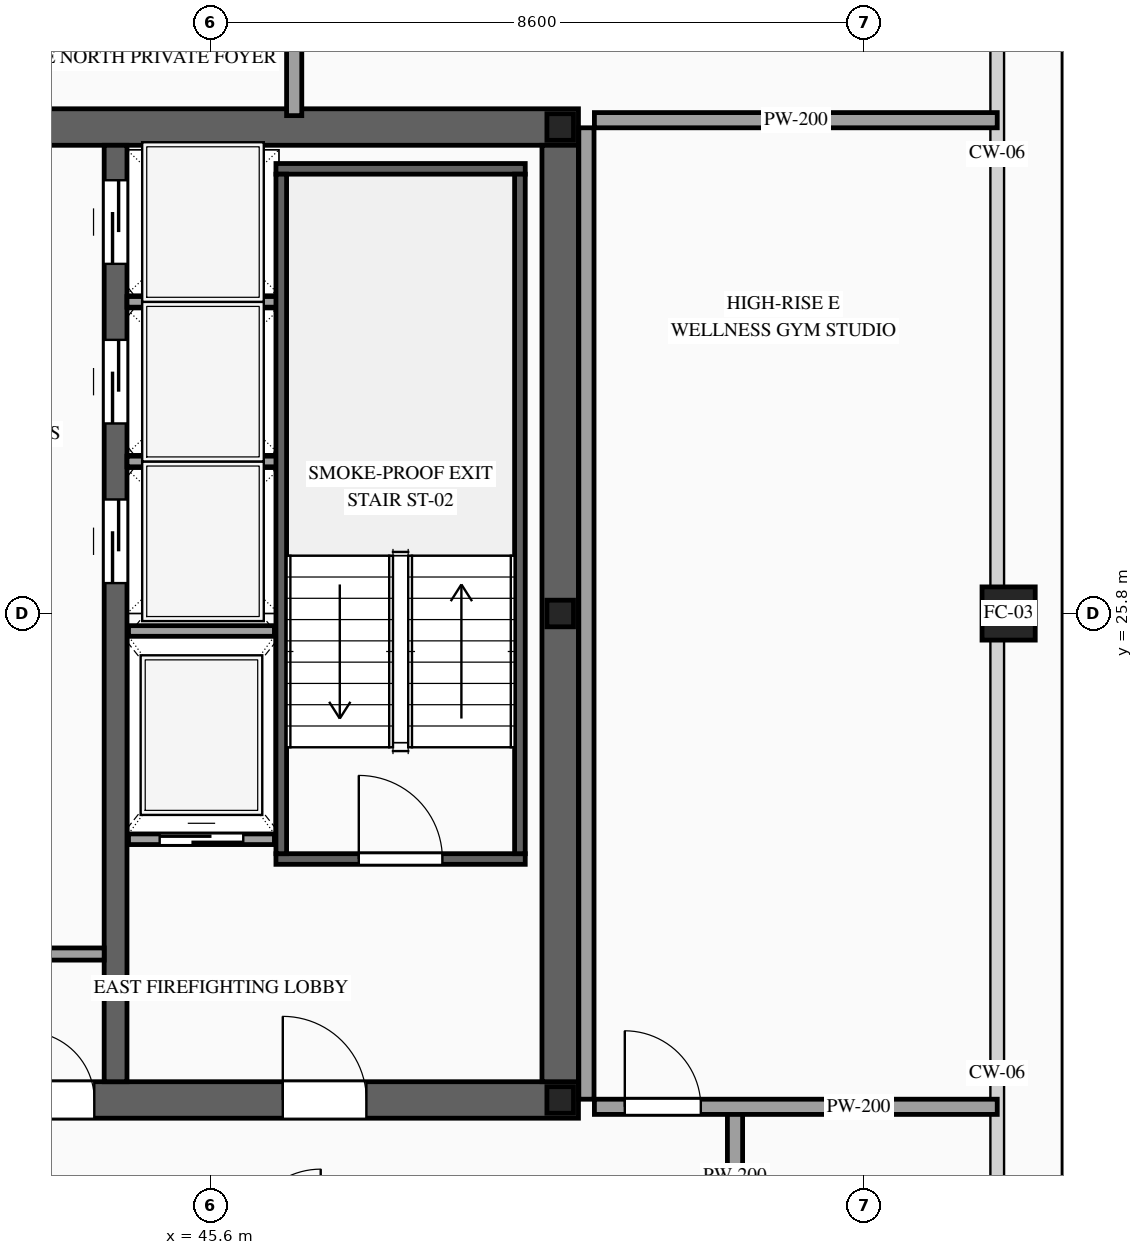
"""IFC4 building model, lengths in metres.
Left out: names, types, materials, properties, quantities, classifications, styles, units other than length and angle.
Written with IfcOpenShell. Run it as: python <this file> out.ifc"""

import sys

from ifc_helpers import new_model, si_unit, direction, frame, frame_2d, origin, origin_2d, place, context, subcontext, project, spatial, rectangle, hollow_rectangle, i_section, extrude, source, transform, mapped, element, fill, save


model = new_model("IFC4")
c1 = context("Model", 3, precision=1e-05, world=origin(), true_north=direction((0.0, 1.0)))
c2 = subcontext(c1, "Body", "Model", "MODEL_VIEW")
j1 = project(units=[si_unit("LENGTHUNIT", "METRE"), si_unit("PLANEANGLEUNIT", "RADIAN")], contexts=[c1])
p1 = place(None, origin())
s1 = spatial("IfcSite", under=j1, at=p1, CompositionType="ELEMENT")
p2 = place(p1, origin())
s2 = spatial("IfcBuilding", under=s1, at=p2, CompositionType="ELEMENT")
p3 = place(p2, frame((0.0, 0.0, 299.6)))
s3 = spatial("IfcBuildingStorey", under=s2, at=p3, CompositionType="ELEMENT", Elevation=299.6)
p4 = place(p3, frame((23.56, 19.4, 0.0), z_axis=(0.0, 0.0, 1.0), x_axis=(1.0, 0.0, 0.0)))
e1 = element("IfcWall", 1, at=p4, inside=s3, PredefinedType="SHEAR", context=c2, shape_type="SweptSolid", body=[
    extrude(rectangle(XDim=26.88, YDim=0.48, at=frame_2d((13.44, 0.0))), origin(), (0.0, 0.0, 1.0), 3.5),
])
p5 = place(p4, frame((1.89, 0.0, 0.0)))
e2 = element("IfcOpeningElement", 2, at=p5, cuts=e1, PredefinedType="OPENING", context=c2, shape_type="SweptSolid", body=[
    extrude(rectangle(XDim=1.1, YDim=2.2, at=frame_2d((0.55, 1.1))), frame((0.0, 0.255, 0.0), z_axis=(0.0, -1.0, 0.0), x_axis=(1.0, 0.0, 0.0)), (0.0, 0.0, 1.0), 0.51),
])
p6 = place(p4, frame((9.79, 0.0, 0.0)))
e3 = element("IfcOpeningElement", 3, at=p6, cuts=e1, PredefinedType="OPENING", context=c2, shape_type="SweptSolid", body=[
    extrude(rectangle(XDim=1.1, YDim=2.2, at=frame_2d((0.55, 1.1))), frame((0.0, 0.255, 0.0), z_axis=(0.0, -1.0, 0.0), x_axis=(1.0, 0.0, 0.0)), (0.0, 0.0, 1.0), 0.51),
])
p7 = place(p4, frame((22.99, 0.0, 0.0)))
e4 = element("IfcOpeningElement", 4, at=p7, cuts=e1, PredefinedType="OPENING", context=c2, shape_type="SweptSolid", body=[
    extrude(rectangle(XDim=1.1, YDim=2.2, at=frame_2d((0.55, 1.1))), frame((0.0, 0.255, 0.0), z_axis=(0.0, -1.0, 0.0), x_axis=(1.0, 0.0, 0.0)), (0.0, 0.0, 1.0), 0.51),
])
p8 = place(p4, frame((19.61, 0.0, 0.0)))
e5 = element("IfcOpeningElement", 5, at=p8, cuts=e1, PredefinedType="OPENING", context=c2, shape_type="SweptSolid", body=[
    extrude(rectangle(XDim=0.9, YDim=2.15, at=frame_2d((0.45, 1.075))), frame((0.0, 0.255, 0.0), z_axis=(0.0, -1.0, 0.0), x_axis=(1.0, 0.0, 0.0)), (0.0, 0.0, 1.0), 0.51),
])
p9 = place(p4, frame((18.17, 0.0, 0.0)))
e6 = element("IfcOpeningElement", 6, at=p9, cuts=e1, PredefinedType="OPENING", context=c2, shape_type="SweptSolid", body=[
    extrude(rectangle(XDim=0.9, YDim=2.15, at=frame_2d((0.45, 1.075))), frame((0.0, 0.255, 0.0), z_axis=(0.0, -1.0, 0.0), x_axis=(1.0, 0.0, 0.0)), (0.0, 0.0, 1.0), 0.51),
])
p10 = place(p3, frame((23.56, 32.2, 0.0), z_axis=(0.0, 0.0, 1.0), x_axis=(1.0, 0.0, 0.0)))
e7 = element("IfcWall", 7, at=p10, inside=s3, PredefinedType="SHEAR", context=c2, shape_type="SweptSolid", body=[
    extrude(rectangle(XDim=26.88, YDim=0.48, at=frame_2d((13.44, 0.0))), origin(), (0.0, 0.0, 1.0), 3.5),
])
p11 = place(p10, frame((4.51, 0.0, 0.0)))
e8 = element("IfcOpeningElement", 8, at=p11, cuts=e7, PredefinedType="OPENING", context=c2, shape_type="SweptSolid", body=[
    extrude(rectangle(XDim=0.9, YDim=2.15, at=frame_2d((0.45, 1.075))), frame((0.0, 0.255, 0.0), z_axis=(0.0, -1.0, 0.0), x_axis=(1.0, 0.0, 0.0)), (0.0, 0.0, 1.0), 0.51),
])
p12 = place(p10, frame((9.79, 0.0, 0.0)))
e9 = element("IfcOpeningElement", 9, at=p12, cuts=e7, PredefinedType="OPENING", context=c2, shape_type="SweptSolid", body=[
    extrude(rectangle(XDim=1.1, YDim=2.2, at=frame_2d((0.55, 1.1))), frame((0.0, 0.255, 0.0), z_axis=(0.0, -1.0, 0.0), x_axis=(1.0, 0.0, 0.0)), (0.0, 0.0, 1.0), 0.51),
])
p13 = place(p10, frame((15.64, 0.0, 0.0)))
e10 = element("IfcOpeningElement", 10, at=p13, cuts=e7, PredefinedType="OPENING", context=c2, shape_type="SweptSolid", body=[
    extrude(rectangle(XDim=1.1, YDim=2.2, at=frame_2d((0.55, 1.1))), frame((0.0, 0.255, 0.0), z_axis=(0.0, -1.0, 0.0), x_axis=(1.0, 0.0, 0.0)), (0.0, 0.0, 1.0), 0.51),
])
p14 = place(p10, frame((18.74, 0.0, 0.0)))
e11 = element("IfcOpeningElement", 11, at=p14, cuts=e7, PredefinedType="OPENING", context=c2, shape_type="SweptSolid", body=[
    extrude(rectangle(XDim=1.1, YDim=2.2, at=frame_2d((0.55, 1.1))), frame((0.0, 0.255, 0.0), z_axis=(0.0, -1.0, 0.0), x_axis=(1.0, 0.0, 0.0)), (0.0, 0.0, 1.0), 0.51),
])
m1 = source(origin(), c2, "Body", "SweptSolid", [
    extrude(rectangle(XDim=12.32, YDim=0.48, at=frame_2d((6.16, 0.0))), origin(), (0.0, 0.0, 1.0), 3.5),
])
p15 = place(p3, frame((50.2, 19.64, 0.0), z_axis=(0.0, 0.0, 1.0), x_axis=(0.0, 1.0, 0.0)))
e12 = element("IfcWall", 12, at=p15, inside=s3, PredefinedType="SHEAR", context=c2, shape_type="MappedRepresentation", body=[
    mapped(m1, transform((0.0, 0.0, 0.0), scale=1.0)),
])
p16 = place(p3, frame((44.35, 19.64, 0.0), z_axis=(0.0, 0.0, 1.0), x_axis=(0.0, 1.0, 0.0)))
e13 = element("IfcWall", 13, at=p16, inside=s3, PredefinedType="SOLIDWALL", context=c2, shape_type="SweptSolid", body=[
    extrude(rectangle(XDim=12.32, YDim=0.3, at=frame_2d((6.16, 0.0))), origin(), (0.0, 0.0, 1.0), 3.5),
])
p17 = place(p16, frame((6.56, 0.0, 0.0)))
e14 = element("IfcOpeningElement", 14, at=p17, cuts=e13, PredefinedType="OPENING", context=c2, shape_type="SweptSolid", body=[
    extrude(rectangle(XDim=1.1, YDim=2.2, at=frame_2d((0.55, 1.1))), frame((0.0, 0.165, 0.0), z_axis=(0.0, -1.0, 0.0), x_axis=(1.0, 0.0, 0.0)), (0.0, 0.0, 1.0), 0.33),
])
p18 = place(p16, frame((8.66, 0.0, 0.0)))
e15 = element("IfcOpeningElement", 15, at=p18, cuts=e13, PredefinedType="OPENING", context=c2, shape_type="SweptSolid", body=[
    extrude(rectangle(XDim=1.1, YDim=2.2, at=frame_2d((0.55, 1.1))), frame((0.0, 0.165, 0.0), z_axis=(0.0, -1.0, 0.0), x_axis=(1.0, 0.0, 0.0)), (0.0, 0.0, 1.0), 0.33),
])
p19 = place(p16, frame((10.76, 0.0, 0.0)))
e16 = element("IfcOpeningElement", 16, at=p19, cuts=e13, PredefinedType="OPENING", context=c2, shape_type="SweptSolid", body=[
    extrude(rectangle(XDim=1.1, YDim=2.2, at=frame_2d((0.55, 1.1))), frame((0.0, 0.165, 0.0), z_axis=(0.0, -1.0, 0.0), x_axis=(1.0, 0.0, 0.0)), (0.0, 0.0, 1.0), 0.33),
])
m2 = source(origin(), c2, "Body", "SweptSolid", [
    extrude(i_section(OverallWidth=0.35, OverallDepth=0.35, WebThickness=0.012, FlangeThickness=0.019, at=origin_2d()), origin(), (0.0, 0.0, 1.0), 3.5),
])
for number, where, z_axis, x_axis in (
    (17, (50.2, 19.4, 0.0), (0.0, 0.0, 1.0), (1.0, 0.0, 0.0)),
    (18, (50.2, 25.8, 0.0), (0.0, 0.0, 1.0), (1.0, 0.0, 0.0)),
    (19, (50.2, 32.2, 0.0), (0.0, 0.0, 1.0), (1.0, 0.0, 0.0)),
):
    element("IfcColumn", number, at=place(p3, frame(where, z_axis=z_axis, x_axis=x_axis)), inside=s3, PredefinedType="COLUMN", context=c2, shape_type="MappedRepresentation", body=[
        mapped(m2, transform((0.0, 0.0, 0.0), scale=1.0)),
    ])
m3 = source(origin(), c2, "Body", "SweptSolid", [
    extrude(hollow_rectangle(XDim=0.7, YDim=0.7, WallThickness=0.032, at=origin_2d()), origin(), (0.0, 0.0, 1.0), 3.5),
])
p20 = place(p3, frame((56.1, 25.8, 0.0), z_axis=(0.0, 0.0, 1.0), x_axis=(1.0, 0.0, 0.0)))
e20 = element("IfcColumn", 20, at=p20, inside=s3, PredefinedType="COLUMN", context=c2, shape_type="MappedRepresentation", body=[
    mapped(m3, transform((0.0, 0.0, 0.0), scale=1.0)),
])
p21 = place(p3, frame((44.52, 22.83, 0.0), z_axis=(0.0, 0.0, 1.0), x_axis=(1.0, 0.0, 0.0)))
e21 = element("IfcWall", 21, at=p21, inside=s3, PredefinedType="SOLIDWALL", context=c2, shape_type="SweptSolid", body=[
    extrude(rectangle(XDim=1.92, YDim=0.14, at=frame_2d((0.96, 0.0))), origin(), (0.0, 0.0, 1.0), 3.28),
])
p22 = place(p21, frame((0.41, 0.0, 0.0)))
e22 = element("IfcOpeningElement", 22, at=p22, cuts=e21, PredefinedType="OPENING", context=c2, shape_type="SweptSolid", body=[
    extrude(rectangle(XDim=1.1, YDim=2.2, at=frame_2d((0.55, 1.1))), frame((0.0, 0.085, 0.0), z_axis=(0.0, -1.0, 0.0), x_axis=(1.0, 0.0, 0.0)), (0.0, 0.0, 1.0), 0.17),
])
m4 = source(origin(), c2, "Body", "SweptSolid", [
    extrude(rectangle(XDim=1.92, YDim=0.14, at=frame_2d((0.96, 0.0))), origin(), (0.0, 0.0, 1.0), 3.28),
])
p23 = place(p3, frame((44.52, 25.57, 0.0), z_axis=(0.0, 0.0, 1.0), x_axis=(1.0, 0.0, 0.0)))
e23 = element("IfcWall", 23, at=p23, inside=s3, PredefinedType="SOLIDWALL", context=c2, shape_type="MappedRepresentation", body=[
    mapped(m4, transform((0.0, 0.0, 0.0), scale=1.0)),
])
m5 = source(origin(), c2, "Body", "SweptSolid", [
    extrude(rectangle(XDim=2.0, YDim=0.14, at=frame_2d((1.0, 0.0))), origin(), (0.0, 0.0, 1.0), 3.28),
])
for number, where, z_axis, x_axis in (
    (24, (44.5, 27.8, 0.0), (0.0, 0.0, 1.0), (1.0, 0.0, 0.0)),
    (25, (44.5, 29.9, 0.0), (0.0, 0.0, 1.0), (1.0, 0.0, 0.0)),
):
    element("IfcWall", number, at=place(p3, frame(where, z_axis=z_axis, x_axis=x_axis)), inside=s3, PredefinedType="SOLIDWALL", context=c2, shape_type="MappedRepresentation", body=[
        mapped(m5, transform((0.0, 0.0, 0.0), scale=1.0)),
    ])
p24 = place(p3, frame((46.46, 22.57, 0.0), z_axis=(0.0, 0.0, 1.0), x_axis=(1.0, 0.0, 0.0)))
e26 = element("IfcWall", 26, at=p24, inside=s3, PredefinedType="SOLIDWALL", context=c2, shape_type="SweptSolid", body=[
    extrude(rectangle(XDim=3.28, YDim=0.14, at=frame_2d((1.64, 0.0))), origin(), (0.0, 0.0, 1.0), 3.28),
])
p25 = place(p24, frame((1.09, 0.0, 0.0)))
e27 = element("IfcOpeningElement", 27, at=p25, cuts=e26, PredefinedType="OPENING", context=c2, shape_type="SweptSolid", body=[
    extrude(rectangle(XDim=1.1, YDim=2.2, at=frame_2d((0.55, 1.1))), frame((0.0, 0.085, 0.0), z_axis=(0.0, -1.0, 0.0), x_axis=(1.0, 0.0, 0.0)), (0.0, 0.0, 1.0), 0.17),
])
m6 = source(origin(), c2, "Body", "SweptSolid", [
    extrude(rectangle(XDim=3.28, YDim=0.14, at=frame_2d((1.64, 0.0))), origin(), (0.0, 0.0, 1.0), 3.28),
])
p26 = place(p3, frame((46.46, 31.65, 0.0), z_axis=(0.0, 0.0, 1.0), x_axis=(1.0, 0.0, 0.0)))
e28 = element("IfcWall", 28, at=p26, inside=s3, PredefinedType="SOLIDWALL", context=c2, shape_type="MappedRepresentation", body=[
    mapped(m6, transform((0.0, 0.0, 0.0), scale=1.0)),
])
m7 = source(origin(), c2, "Body", "SweptSolid", [
    extrude(rectangle(XDim=8.94, YDim=0.14, at=frame_2d((4.47, 0.0))), origin(), (0.0, 0.0, 1.0), 3.28),
])
for number, where, z_axis, x_axis in (
    (29, (46.53, 22.64, 0.0), (0.0, 0.0, 1.0), (0.0, 1.0, 0.0)),
    (30, (49.67, 22.64, 0.0), (0.0, 0.0, 1.0), (0.0, 1.0, 0.0)),
):
    element("IfcWall", number, at=place(p3, frame(where, z_axis=z_axis, x_axis=x_axis)), inside=s3, PredefinedType="SOLIDWALL", context=c2, shape_type="MappedRepresentation", body=[
        mapped(m7, transform((0.0, 0.0, 0.0), scale=1.0)),
    ])
m8 = source(origin(), c2, "Body", "SweptSolid", [
    extrude(rectangle(XDim=1.17, YDim=0.16, at=frame_2d((0.585, 0.0))), origin(), (0.0, 0.0, 1.0), 3.28),
])
p27 = place(p3, frame((43.03, 21.32, 0.0), z_axis=(0.0, 0.0, 1.0), x_axis=(1.0, 0.0, 0.0)))
e31 = element("IfcWall", 31, at=p27, inside=s3, PredefinedType="PARTITIONING", context=c2, shape_type="MappedRepresentation", body=[
    mapped(m8, transform((0.0, 0.0, 0.0), scale=1.0)),
])
m9 = source(origin(), c2, "Body", "SweptSolid", [
    extrude(rectangle(XDim=1.7, YDim=0.2, at=frame_2d((0.85, 0.0))), origin(), (0.0, 0.0, 1.0), 3.28),
])
for number, where, z_axis, x_axis in (
    (32, (46.7, 32.35, 0.0), (0.0, 0.0, 1.0), (0.0, 1.0, 0.0)),
    (33, (52.5, 17.55, 0.0), (0.0, 0.0, 1.0), (0.0, 1.0, 0.0)),
):
    element("IfcWall", number, at=place(p3, frame(where, z_axis=z_axis, x_axis=x_axis)), inside=s3, PredefinedType="PARTITIONING", context=c2, shape_type="MappedRepresentation", body=[
        mapped(m9, transform((0.0, 0.0, 0.0), scale=1.0)),
    ])
p28 = place(p3, frame((50.65, 19.31, 0.0), z_axis=(0.0, 0.0, 1.0), x_axis=(1.0, 0.0, 0.0)))
e34 = element("IfcWall", 34, at=p28, inside=s3, PredefinedType="PARTITIONING", context=c2, shape_type="SweptSolid", body=[
    extrude(rectangle(XDim=5.3, YDim=0.2, at=frame_2d((2.65, 0.0))), origin(), (0.0, 0.0, 1.0), 2.825),
])
p29 = place(p28, frame((0.4, 0.0, 0.0)))
e35 = element("IfcOpeningElement", 35, at=p29, cuts=e34, PredefinedType="OPENING", context=c2, shape_type="SweptSolid", body=[
    extrude(rectangle(XDim=1.0, YDim=2.2, at=frame_2d((0.5, 1.1))), frame((0.0, 0.115, 0.0), z_axis=(0.0, -1.0, 0.0), x_axis=(1.0, 0.0, 0.0)), (0.0, 0.0, 1.0), 0.23),
])
m10 = source(origin(), c2, "Body", "SweptSolid", [
    extrude(rectangle(XDim=5.3, YDim=0.2, at=frame_2d((2.65, 0.0))), origin(), (0.0, 0.0, 1.0), 2.825),
])
p30 = place(p3, frame((50.65, 32.29, 0.0), z_axis=(0.0, 0.0, 1.0), x_axis=(1.0, 0.0, 0.0)))
e36 = element("IfcWall", 36, at=p30, inside=s3, PredefinedType="PARTITIONING", context=c2, shape_type="MappedRepresentation", body=[
    mapped(m10, transform((0.0, 0.0, 0.0), scale=1.0)),
])
m11 = source(origin(), c2, "Body", "SweptSolid", [
    extrude(rectangle(XDim=12.78, YDim=0.2, at=frame_2d((6.39, 0.0))), origin(), (0.0, 0.0, 1.0), 3.28),
])
p31 = place(p3, frame((50.545, 19.41, 0.0), z_axis=(0.0, 0.0, 1.0), x_axis=(0.0, 1.0, 0.0)))
e37 = element("IfcWall", 37, at=p31, inside=s3, PredefinedType="PARTITIONING", context=c2, shape_type="MappedRepresentation", body=[
    mapped(m11, transform((0.0, 0.0, 0.0), scale=1.0)),
])
m12 = source(origin(), c2, "Body", "SweptSolid", [
    extrude(rectangle(XDim=1.1, YDim=2.2, at=frame_2d((0.55, 1.1))), frame((0.0, 0.025, 0.0), z_axis=(0.0, -1.0, 0.0), x_axis=(1.0, 0.0, 0.0)), (0.0, 0.0, 1.0), 0.05),
])
p32 = place(p22, origin())
e38 = element("IfcDoor", 38, at=p32, inside=s3, OperationType="SLIDING_TO_RIGHT", PredefinedType="DOOR", context=c2, shape_type="MappedRepresentation", body=[
    mapped(m12, transform((0.0, 0.0, 0.0), scale=1.0)),
])
fill(e22, e38)
p33 = place(p17, origin())
e39 = element("IfcDoor", 39, at=p33, inside=s3, OperationType="SLIDING_TO_LEFT", PredefinedType="DOOR", context=c2, shape_type="MappedRepresentation", body=[
    mapped(m12, transform((0.0, 0.0, 0.0), scale=1.0)),
])
fill(e14, e39)
p34 = place(p18, origin())
e40 = element("IfcDoor", 40, at=p34, inside=s3, OperationType="SLIDING_TO_RIGHT", PredefinedType="DOOR", context=c2, shape_type="MappedRepresentation", body=[
    mapped(m12, transform((0.0, 0.0, 0.0), scale=1.0)),
])
fill(e15, e40)
p35 = place(p19, origin())
e41 = element("IfcDoor", 41, at=p35, inside=s3, OperationType="SLIDING_TO_LEFT", PredefinedType="DOOR", context=c2, shape_type="MappedRepresentation", body=[
    mapped(m12, transform((0.0, 0.0, 0.0), scale=1.0)),
])
fill(e16, e41)
m13 = source(origin(), c2, "Body", "SweptSolid", [
    extrude(rectangle(XDim=1.1, YDim=2.2, at=frame_2d((0.55, 1.1))), frame((0.0, 0.025, 0.0), z_axis=(0.0, -1.0, 0.0), x_axis=(1.0, 0.0, 0.0)), (0.0, 0.0, 1.0), 0.05),
])
p36 = place(p25, origin())
e42 = element("IfcDoor", 42, at=p36, inside=s3, OperationType="SINGLE_SWING_LEFT", PredefinedType="DOOR", context=c2, shape_type="MappedRepresentation", body=[
    mapped(m13, transform((0.0, 0.0, 0.0), scale=1.0)),
])
fill(e27, e42)
p37 = place(p7, origin())
e43 = element("IfcDoor", 43, at=p37, inside=s3, OperationType="SINGLE_SWING_LEFT", PredefinedType="DOOR", context=c2, shape_type="MappedRepresentation", body=[
    mapped(m13, transform((0.0, 0.0, 0.0), scale=1.0)),
])
fill(e4, e43)
m14 = source(origin(), c2, "Body", "SweptSolid", [
    extrude(rectangle(XDim=0.9, YDim=2.15, at=frame_2d((0.45, 1.075))), frame((0.0, 0.025, 0.0), z_axis=(0.0, -1.0, 0.0), x_axis=(1.0, 0.0, 0.0)), (0.0, 0.0, 1.0), 0.05),
])
p38 = place(p8, origin())
e44 = element("IfcDoor", 44, at=p38, inside=s3, OperationType="SINGLE_SWING_LEFT", PredefinedType="DOOR", context=c2, shape_type="MappedRepresentation", body=[
    mapped(m14, transform((0.0, 0.0, 0.0), scale=1.0)),
])
fill(e5, e44)
m15 = source(origin(), c2, "Body", "SweptSolid", [
    extrude(rectangle(XDim=1.0, YDim=2.2, at=frame_2d((0.5, 1.1))), frame((0.0, 0.025, 0.0), z_axis=(0.0, -1.0, 0.0), x_axis=(1.0, 0.0, 0.0)), (0.0, 0.0, 1.0), 0.05),
])
p39 = place(p29, origin())
e45 = element("IfcDoor", 45, at=p39, inside=s3, OperationType="SINGLE_SWING_LEFT", PredefinedType="DOOR", context=c2, shape_type="MappedRepresentation", body=[
    mapped(m15, transform((0.0, 0.0, 0.0), scale=1.0)),
])
fill(e35, e45)
save(model, sys.argv[1])
